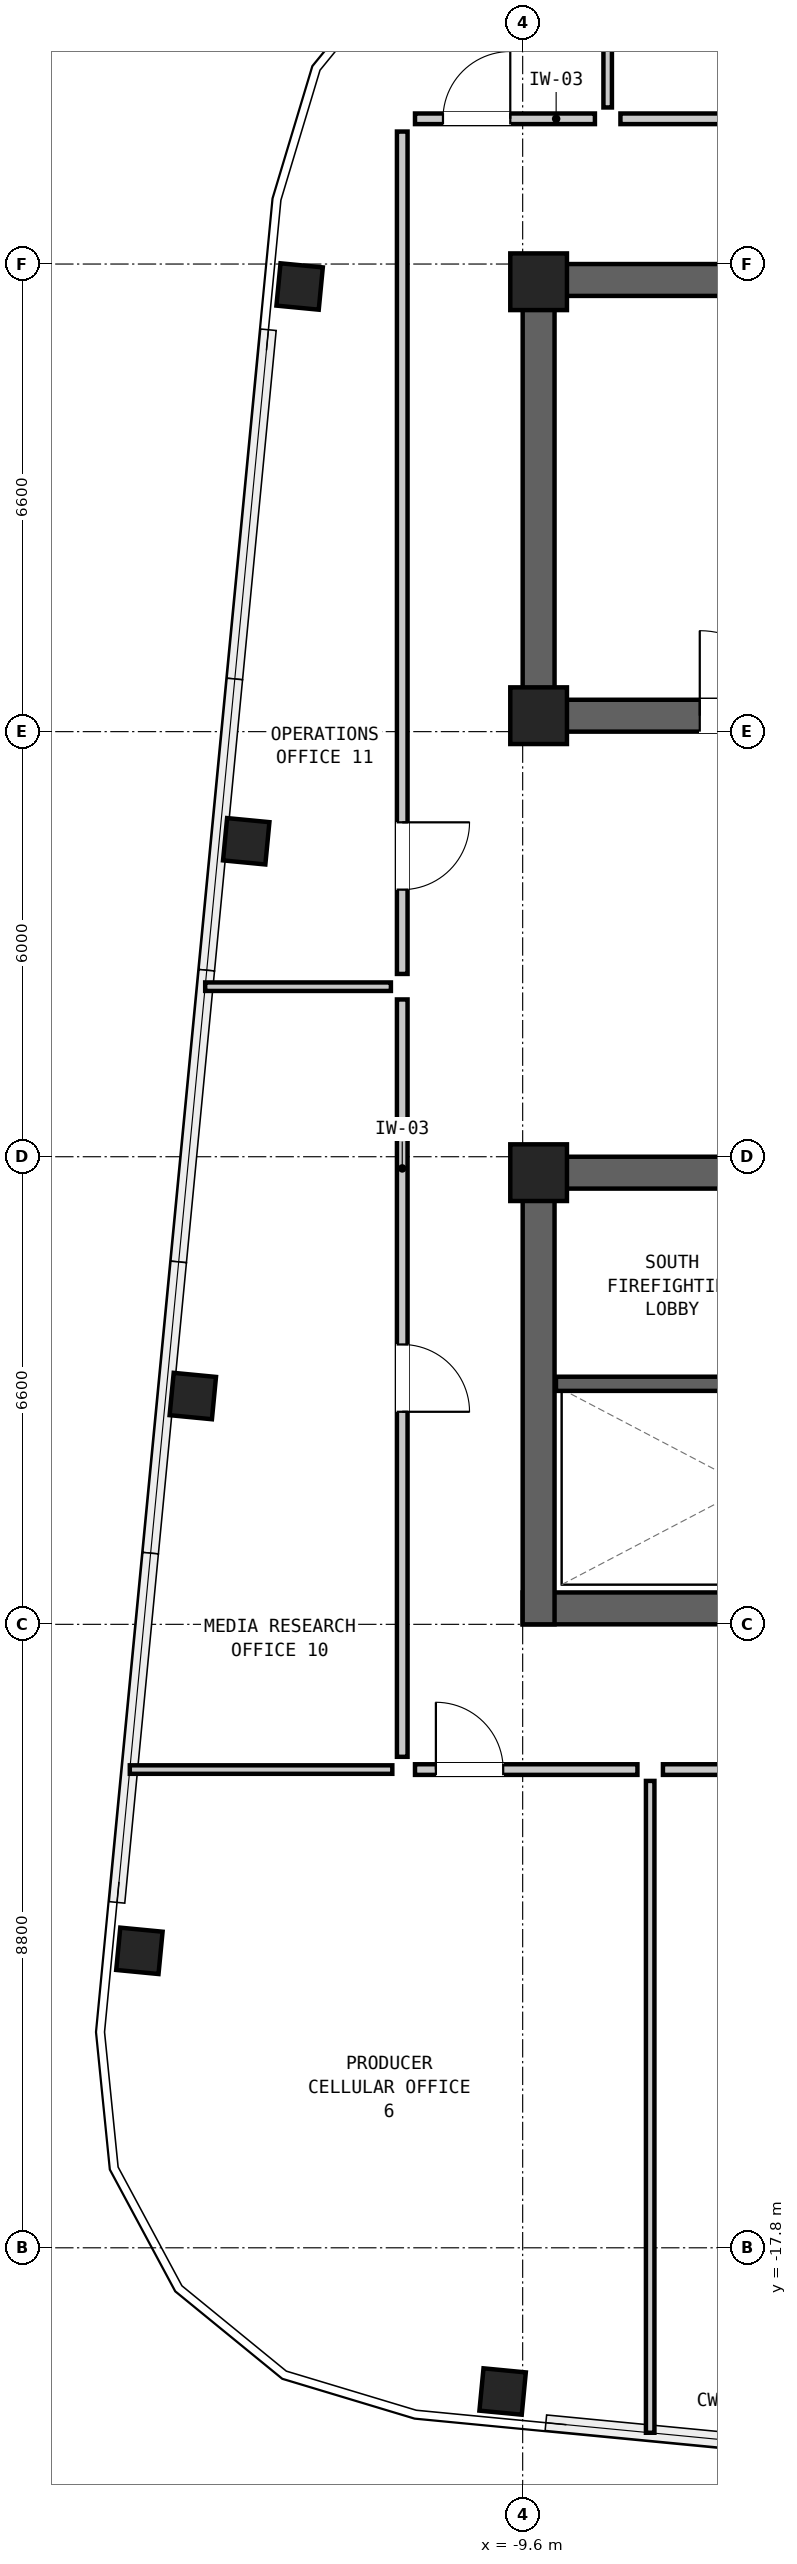
"""IFC4 building model, lengths in metres.
Left out: names, types, materials, properties, quantities, classifications, styles, units other than length and angle.
Written with IfcOpenShell. Run it as: python <this file> out.ifc"""

import sys

from ifc_helpers import new_model, si_unit, direction, frame, frame_2d, origin, origin_2d, place, context, subcontext, project, spatial, rectangle, hollow_rectangle, extrude, element, fill, save


model = new_model("IFC4")
c1 = context("Model", 3, precision=1e-05, world=origin(), true_north=direction((0.0, 1.0)))
c2 = subcontext(c1, "Body", "Model", "MODEL_VIEW")
j1 = project(units=[si_unit("LENGTHUNIT", "METRE"), si_unit("PLANEANGLEUNIT", "RADIAN")], contexts=[c1])
p1 = place(None, origin())
s1 = spatial("IfcSite", under=j1, at=p1, CompositionType="ELEMENT")
p2 = place(p1, origin())
s2 = spatial("IfcBuilding", under=s1, at=p2, CompositionType="ELEMENT")
p3 = place(p2, frame((0.0, 0.0, 252.0)))
s3 = spatial("IfcBuildingStorey", under=s2, at=p3, CompositionType="ELEMENT", Elevation=252.0)
p4 = place(p3, frame((-9.6, 9.975, 0.0), z_axis=(0.0, 0.0, 1.0), x_axis=(1.0, 0.0, 0.0)))
e1 = element("IfcWall", 1, at=p4, inside=s3, PredefinedType="SHEAR", context=c2, shape_type="SweptSolid", body=[
    extrude(rectangle(XDim=19.2, YDim=0.45, at=frame_2d((9.6, 0.0))), origin(), (0.0, 0.0, 1.0), 3.05),
])
p5 = place(p3, frame((-9.6, 3.825, 0.0), z_axis=(0.0, 0.0, 1.0), x_axis=(1.0, 0.0, 0.0)))
e2 = element("IfcWall", 2, at=p5, inside=s3, PredefinedType="SHEAR", context=c2, shape_type="SweptSolid", body=[
    extrude(rectangle(XDim=19.2, YDim=0.45, at=frame_2d((9.6, 0.0))), origin(), (0.0, 0.0, 1.0), 3.05),
])
p6 = place(p5, frame((14.2, 0.0, 0.0)))
e3 = element("IfcOpeningElement", 3, at=p6, cuts=e2, PredefinedType="OPENING", context=c2, shape_type="SweptSolid", body=[
    extrude(rectangle(XDim=1.1, YDim=2.08, at=frame_2d((0.55, 1.04))), frame((0.0, 0.237, 0.0), z_axis=(0.0, -1.0, 0.0), x_axis=(1.0, 0.0, 0.0)), (0.0, 0.0, 1.0), 0.474),
])
p7 = place(p5, frame((8.2, 0.0, 0.0)))
e4 = element("IfcOpeningElement", 4, at=p7, cuts=e2, PredefinedType="OPENING", context=c2, shape_type="SweptSolid", body=[
    extrude(rectangle(XDim=1.15, YDim=2.1, at=frame_2d((0.575, 1.05))), frame((0.0, 0.237, 0.0), z_axis=(0.0, -1.0, 0.0), x_axis=(1.0, 0.0, 0.0)), (0.0, 0.0, 1.0), 0.474),
])
p8 = place(p5, frame((2.5, 0.0, 0.0)))
e5 = element("IfcOpeningElement", 5, at=p8, cuts=e2, PredefinedType="OPENING", context=c2, shape_type="SweptSolid", body=[
    extrude(rectangle(XDim=1.2, YDim=2.1, at=frame_2d((0.6, 1.05))), frame((0.0, 0.237, 0.0), z_axis=(0.0, -1.0, 0.0), x_axis=(1.0, 0.0, 0.0)), (0.0, 0.0, 1.0), 0.474),
])
p9 = place(p3, frame((-9.375, 3.6, 0.0), z_axis=(0.0, 0.0, 1.0), x_axis=(0.0, 1.0, 0.0)))
e6 = element("IfcWall", 6, at=p9, inside=s3, PredefinedType="SHEAR", context=c2, shape_type="SweptSolid", body=[
    extrude(rectangle(XDim=6.6, YDim=0.45, at=frame_2d((3.3, 0.0))), origin(), (0.0, 0.0, 1.0), 3.05),
])
p10 = place(p3, frame((-9.6, -8.775, 0.0), z_axis=(0.0, 0.0, 1.0), x_axis=(1.0, 0.0, 0.0)))
e7 = element("IfcWall", 7, at=p10, inside=s3, PredefinedType="SHEAR", context=c2, shape_type="SweptSolid", body=[
    extrude(rectangle(XDim=19.2, YDim=0.45, at=frame_2d((9.6, 0.0))), origin(), (0.0, 0.0, 1.0), 3.05),
])
p11 = place(p3, frame((-9.6, -2.625, 0.0), z_axis=(0.0, 0.0, 1.0), x_axis=(1.0, 0.0, 0.0)))
e8 = element("IfcWall", 8, at=p11, inside=s3, PredefinedType="SHEAR", context=c2, shape_type="SweptSolid", body=[
    extrude(rectangle(XDim=19.2, YDim=0.45, at=frame_2d((9.6, 0.0))), origin(), (0.0, 0.0, 1.0), 3.05),
])
p12 = place(p11, frame((3.8, 0.0, 0.0)))
e9 = element("IfcOpeningElement", 9, at=p12, cuts=e8, PredefinedType="OPENING", context=c2, shape_type="SweptSolid", body=[
    extrude(rectangle(XDim=1.1, YDim=2.08, at=frame_2d((0.55, 1.04))), frame((0.0, 0.237, 0.0), z_axis=(0.0, -1.0, 0.0), x_axis=(1.0, 0.0, 0.0)), (0.0, 0.0, 1.0), 0.474),
])
p13 = place(p11, frame((10.8, 0.0, 0.0)))
e10 = element("IfcOpeningElement", 10, at=p13, cuts=e8, PredefinedType="OPENING", context=c2, shape_type="SweptSolid", body=[
    extrude(rectangle(XDim=0.95, YDim=2.1, at=frame_2d((0.475, 1.05))), frame((0.0, 0.237, 0.0), z_axis=(0.0, -1.0, 0.0), x_axis=(1.0, 0.0, 0.0)), (0.0, 0.0, 1.0), 0.474),
])
p14 = place(p11, frame((14.8, 0.0, 0.0)))
e11 = element("IfcOpeningElement", 11, at=p14, cuts=e8, PredefinedType="OPENING", context=c2, shape_type="SweptSolid", body=[
    extrude(rectangle(XDim=1.6, YDim=2.12, at=frame_2d((0.8, 1.06))), frame((0.0, 0.237, 0.0), z_axis=(0.0, -1.0, 0.0), x_axis=(1.0, 0.0, 0.0)), (0.0, 0.0, 1.0), 0.474),
])
p15 = place(p3, frame((-9.375, -9.0, 0.0), z_axis=(0.0, 0.0, 1.0), x_axis=(0.0, 1.0, 0.0)))
e12 = element("IfcWall", 12, at=p15, inside=s3, PredefinedType="SHEAR", context=c2, shape_type="SweptSolid", body=[
    extrude(rectangle(XDim=6.6, YDim=0.45, at=frame_2d((3.3, 0.0))), origin(), (0.0, 0.0, 1.0), 3.05),
])
for number, where, z_axis, x_axis in (
    (13, (-9.883, -19.829, 0.0), (0.0, 0.0, 1.0), (0.995, -0.096, 0.0)),
    (14, (-12.749, 9.883, 0.0), (0.0, 0.0, 1.0), (0.096, 0.995, 0.0)),
    (15, (-13.502, 2.052, 0.0), (0.0, 0.0, 1.0), (0.096, 0.995, 0.0)),
    (16, (-14.256, -5.778, 0.0), (0.0, 0.0, 1.0), (0.096, 0.995, 0.0)),
    (17, (-15.01, -13.608, 0.0), (0.0, 0.0, 1.0), (0.096, 0.995, 0.0)),
):
    element("IfcColumn", number, at=place(p3, frame(where, z_axis=z_axis, x_axis=x_axis)), inside=s3, PredefinedType="COLUMN", context=c2, shape_type="SweptSolid", body=[
        extrude(hollow_rectangle(XDim=0.6, YDim=0.6, WallThickness=0.04, at=origin_2d()), origin(), (0.0, 0.0, 1.0), 3.05),
    ])
for number, where, z_axis, x_axis in (
    (18, (-9.375, 9.95, 0.0), (0.0, 0.0, 1.0), (1.0, 0.0, 0.0)),
    (19, (-9.375, 3.825, 0.0), (0.0, 0.0, 1.0), (1.0, 0.0, 0.0)),
    (20, (-9.375, -2.625, 0.0), (0.0, 0.0, 1.0), (1.0, 0.0, 0.0)),
):
    element("IfcColumn", number, at=place(p3, frame(where, z_axis=z_axis, x_axis=x_axis)), inside=s3, PredefinedType="COLUMN", context=c2, shape_type="SweptSolid", body=[
        extrude(rectangle(XDim=0.8, YDim=0.8, at=origin_2d()), origin(), (0.0, 0.0, 1.0), 3.05),
    ])
p16 = place(p3, frame((-9.13, -5.605, 0.0), z_axis=(0.0, 0.0, 1.0), x_axis=(1.0, 0.0, 0.0)))
e21 = element("IfcWall", 21, at=p16, inside=s3, PredefinedType="SHEAR", context=c2, shape_type="SweptSolid", body=[
    extrude(rectangle(XDim=6.77, YDim=0.2, at=frame_2d((3.385, 0.0))), origin(), (0.0, 0.0, 1.0), 2.86),
])
p17 = place(p16, frame((5.5, 0.0, 0.0)))
e22 = element("IfcOpeningElement", 22, at=p17, cuts=e21, PredefinedType="OPENING", context=c2, shape_type="SweptSolid", body=[
    extrude(rectangle(XDim=1.05, YDim=2.08, at=frame_2d((0.525, 1.04))), frame((0.0, 0.112, 0.0), z_axis=(0.0, -1.0, 0.0), x_axis=(1.0, 0.0, 0.0)), (0.0, 0.0, 1.0), 0.224),
])
p18 = place(p3, frame((-15.146, -11.05, 0.0), z_axis=(0.0, 0.0, 1.0), x_axis=(1.0, 0.0, 0.0)))
e23 = element("IfcWall", 23, at=p18, inside=s3, PredefinedType="PARTITIONING", context=c2, shape_type="SweptSolid", body=[
    extrude(rectangle(XDim=3.706, YDim=0.12, at=frame_2d((1.853, 0.0))), origin(), (0.0, 0.0, 1.0), 2.86),
])
p19 = place(p3, frame((-8.4, 12.41, 0.0), z_axis=(0.0, 0.0, 1.0), x_axis=(0.0, 1.0, 0.0)))
e24 = element("IfcWall", 24, at=p19, inside=s3, PredefinedType="PARTITIONING", context=c2, shape_type="SweptSolid", body=[
    extrude(rectangle(XDim=3.02, YDim=0.12, at=frame_2d((1.51, 0.0))), origin(), (0.0, 0.0, 1.0), 2.86),
])
p20 = place(p3, frame((-7.8, -20.411, 0.0), z_axis=(0.0, 0.0, 1.0), x_axis=(0.0, 1.0, 0.0)))
e25 = element("IfcWall", 25, at=p20, inside=s3, PredefinedType="PARTITIONING", context=c2, shape_type="SweptSolid", body=[
    extrude(rectangle(XDim=9.201, YDim=0.12, at=frame_2d((4.6, 0.0))), origin(), (0.0, 0.0, 1.0), 2.86),
])
p21 = place(p3, frame((-14.082, 0.0, 0.0), z_axis=(0.0, 0.0, 1.0), x_axis=(1.0, 0.0, 0.0)))
e26 = element("IfcWall", 26, at=p21, inside=s3, PredefinedType="PARTITIONING", context=c2, shape_type="SweptSolid", body=[
    extrude(rectangle(XDim=2.622, YDim=0.12, at=frame_2d((1.311, 0.0))), origin(), (0.0, 0.0, 1.0), 2.86),
])
p22 = place(p3, frame((-11.12, 12.25, 0.0), z_axis=(0.0, 0.0, 1.0), x_axis=(1.0, 0.0, 0.0)))
e27 = element("IfcWall", 27, at=p22, inside=s3, PredefinedType="PARTITIONING", context=c2, shape_type="SweptSolid", body=[
    extrude(rectangle(XDim=2.54, YDim=0.15, at=frame_2d((1.27, 0.0))), origin(), (0.0, 0.0, 1.0), 2.86),
])
p23 = place(p22, frame((0.395, 0.0, 0.0)))
e28 = element("IfcOpeningElement", 28, at=p23, cuts=e27, PredefinedType="OPENING", context=c2, shape_type="SweptSolid", body=[
    extrude(rectangle(XDim=0.95, YDim=2.1, at=frame_2d((0.475, 1.05))), frame((0.0, 0.087, 0.0), z_axis=(0.0, -1.0, 0.0), x_axis=(1.0, 0.0, 0.0)), (0.0, 0.0, 1.0), 0.174),
])
p24 = place(p3, frame((-8.22, 12.25, 0.0), z_axis=(0.0, 0.0, 1.0), x_axis=(1.0, 0.0, 0.0)))
e29 = element("IfcWall", 29, at=p24, inside=s3, PredefinedType="PARTITIONING", context=c2, shape_type="SweptSolid", body=[
    extrude(rectangle(XDim=5.24, YDim=0.15, at=frame_2d((2.62, 0.0))), origin(), (0.0, 0.0, 1.0), 2.86),
])
p25 = place(p24, frame((2.145, 0.0, 0.0)))
e30 = element("IfcOpeningElement", 30, at=p25, cuts=e29, PredefinedType="OPENING", context=c2, shape_type="SweptSolid", body=[
    extrude(rectangle(XDim=0.95, YDim=2.1, at=frame_2d((0.475, 1.05))), frame((0.0, 0.087, 0.0), z_axis=(0.0, -1.0, 0.0), x_axis=(1.0, 0.0, 0.0)), (0.0, 0.0, 1.0), 0.174),
])
p26 = place(p3, frame((-11.12, -11.05, 0.0), z_axis=(0.0, 0.0, 1.0), x_axis=(1.0, 0.0, 0.0)))
e31 = element("IfcWall", 31, at=p26, inside=s3, PredefinedType="PARTITIONING", context=c2, shape_type="SweptSolid", body=[
    extrude(rectangle(XDim=3.14, YDim=0.15, at=frame_2d((1.57, 0.0))), origin(), (0.0, 0.0, 1.0), 2.86),
])
p27 = place(p26, frame((0.295, 0.0, 0.0)))
e32 = element("IfcOpeningElement", 32, at=p27, cuts=e31, PredefinedType="OPENING", context=c2, shape_type="SweptSolid", body=[
    extrude(rectangle(XDim=0.95, YDim=2.1, at=frame_2d((0.475, 1.05))), frame((0.0, 0.087, 0.0), z_axis=(0.0, -1.0, 0.0), x_axis=(1.0, 0.0, 0.0)), (0.0, 0.0, 1.0), 0.174),
])
p28 = place(p3, frame((-7.62, -11.05, 0.0), z_axis=(0.0, 0.0, 1.0), x_axis=(1.0, 0.0, 0.0)))
e33 = element("IfcWall", 33, at=p28, inside=s3, PredefinedType="PARTITIONING", context=c2, shape_type="SweptSolid", body=[
    extrude(rectangle(XDim=5.24, YDim=0.15, at=frame_2d((2.62, 0.0))), origin(), (0.0, 0.0, 1.0), 2.86),
])
p29 = place(p28, frame((2.145, 0.0, 0.0)))
e34 = element("IfcOpeningElement", 34, at=p29, cuts=e33, PredefinedType="OPENING", context=c2, shape_type="SweptSolid", body=[
    extrude(rectangle(XDim=0.95, YDim=2.1, at=frame_2d((0.475, 1.05))), frame((0.0, 0.087, 0.0), z_axis=(0.0, -1.0, 0.0), x_axis=(1.0, 0.0, 0.0)), (0.0, 0.0, 1.0), 0.174),
])
p30 = place(p3, frame((-11.3, -0.18, 0.0), z_axis=(0.0, 0.0, 1.0), x_axis=(0.0, -1.0, 0.0)))
e35 = element("IfcWall", 35, at=p30, inside=s3, PredefinedType="PARTITIONING", context=c2, shape_type="SweptSolid", body=[
    extrude(rectangle(XDim=10.69, YDim=0.15, at=frame_2d((5.345, 0.0))), origin(), (0.0, 0.0, 1.0), 2.86),
])
p31 = place(p30, frame((4.87, 0.0, 0.0)))
e36 = element("IfcOpeningElement", 36, at=p31, cuts=e35, PredefinedType="OPENING", context=c2, shape_type="SweptSolid", body=[
    extrude(rectangle(XDim=0.95, YDim=2.1, at=frame_2d((0.475, 1.05))), frame((0.0, 0.087, 0.0), z_axis=(0.0, -1.0, 0.0), x_axis=(1.0, 0.0, 0.0)), (0.0, 0.0, 1.0), 0.174),
])
p32 = place(p3, frame((-11.3, 12.07, 0.0), z_axis=(0.0, 0.0, 1.0), x_axis=(0.0, -1.0, 0.0)))
e37 = element("IfcWall", 37, at=p32, inside=s3, PredefinedType="PARTITIONING", context=c2, shape_type="SweptSolid", body=[
    extrude(rectangle(XDim=11.89, YDim=0.15, at=frame_2d((5.945, 0.0))), origin(), (0.0, 0.0, 1.0), 2.86),
])
p33 = place(p32, frame((9.75, 0.0, 0.0)))
e38 = element("IfcOpeningElement", 38, at=p33, cuts=e37, PredefinedType="OPENING", context=c2, shape_type="SweptSolid", body=[
    extrude(rectangle(XDim=0.95, YDim=2.1, at=frame_2d((0.475, 1.05))), frame((0.0, 0.087, 0.0), z_axis=(0.0, -1.0, 0.0), x_axis=(1.0, 0.0, 0.0)), (0.0, 0.0, 1.0), 0.174),
])
p34 = place(p8, origin())
e39 = element("IfcDoor", 39, at=p34, inside=s3, OperationType="SINGLE_SWING_LEFT", PredefinedType="DOOR", context=c2, shape_type="SweptSolid", body=[
    extrude(rectangle(XDim=1.2, YDim=2.1, at=frame_2d((0.6, 1.05))), frame((0.0, 0.025, 0.0), z_axis=(0.0, -1.0, 0.0), x_axis=(1.0, 0.0, 0.0)), (0.0, 0.0, 1.0), 0.05),
])
fill(e5, e39)
p35 = place(p23, origin())
e40 = element("IfcDoor", 40, at=p35, inside=s3, OperationType="SINGLE_SWING_RIGHT", PredefinedType="DOOR", context=c2, shape_type="SweptSolid", body=[
    extrude(rectangle(XDim=0.95, YDim=2.1, at=frame_2d((0.475, 1.05))), frame((0.0, 0.025, 0.0), z_axis=(0.0, -1.0, 0.0), x_axis=(1.0, 0.0, 0.0)), (0.0, 0.0, 1.0), 0.05),
])
fill(e28, e40)
p36 = place(p27, origin())
e41 = element("IfcDoor", 41, at=p36, inside=s3, OperationType="SINGLE_SWING_LEFT", PredefinedType="DOOR", context=c2, shape_type="SweptSolid", body=[
    extrude(rectangle(XDim=0.95, YDim=2.1, at=frame_2d((0.475, 1.05))), frame((0.0, 0.025, 0.0), z_axis=(0.0, -1.0, 0.0), x_axis=(1.0, 0.0, 0.0)), (0.0, 0.0, 1.0), 0.05),
])
fill(e32, e41)
p37 = place(p31, origin())
e42 = element("IfcDoor", 42, at=p37, inside=s3, OperationType="SINGLE_SWING_RIGHT", PredefinedType="DOOR", context=c2, shape_type="SweptSolid", body=[
    extrude(rectangle(XDim=0.95, YDim=2.1, at=frame_2d((0.475, 1.05))), frame((0.0, 0.025, 0.0), z_axis=(0.0, -1.0, 0.0), x_axis=(1.0, 0.0, 0.0)), (0.0, 0.0, 1.0), 0.05),
])
fill(e36, e42)
p38 = place(p33, origin())
e43 = element("IfcDoor", 43, at=p38, inside=s3, OperationType="SINGLE_SWING_LEFT", PredefinedType="DOOR", context=c2, shape_type="SweptSolid", body=[
    extrude(rectangle(XDim=0.95, YDim=2.1, at=frame_2d((0.475, 1.05))), frame((0.0, 0.025, 0.0), z_axis=(0.0, -1.0, 0.0), x_axis=(1.0, 0.0, 0.0)), (0.0, 0.0, 1.0), 0.05),
])
fill(e38, e43)
save(model, sys.argv[1])
